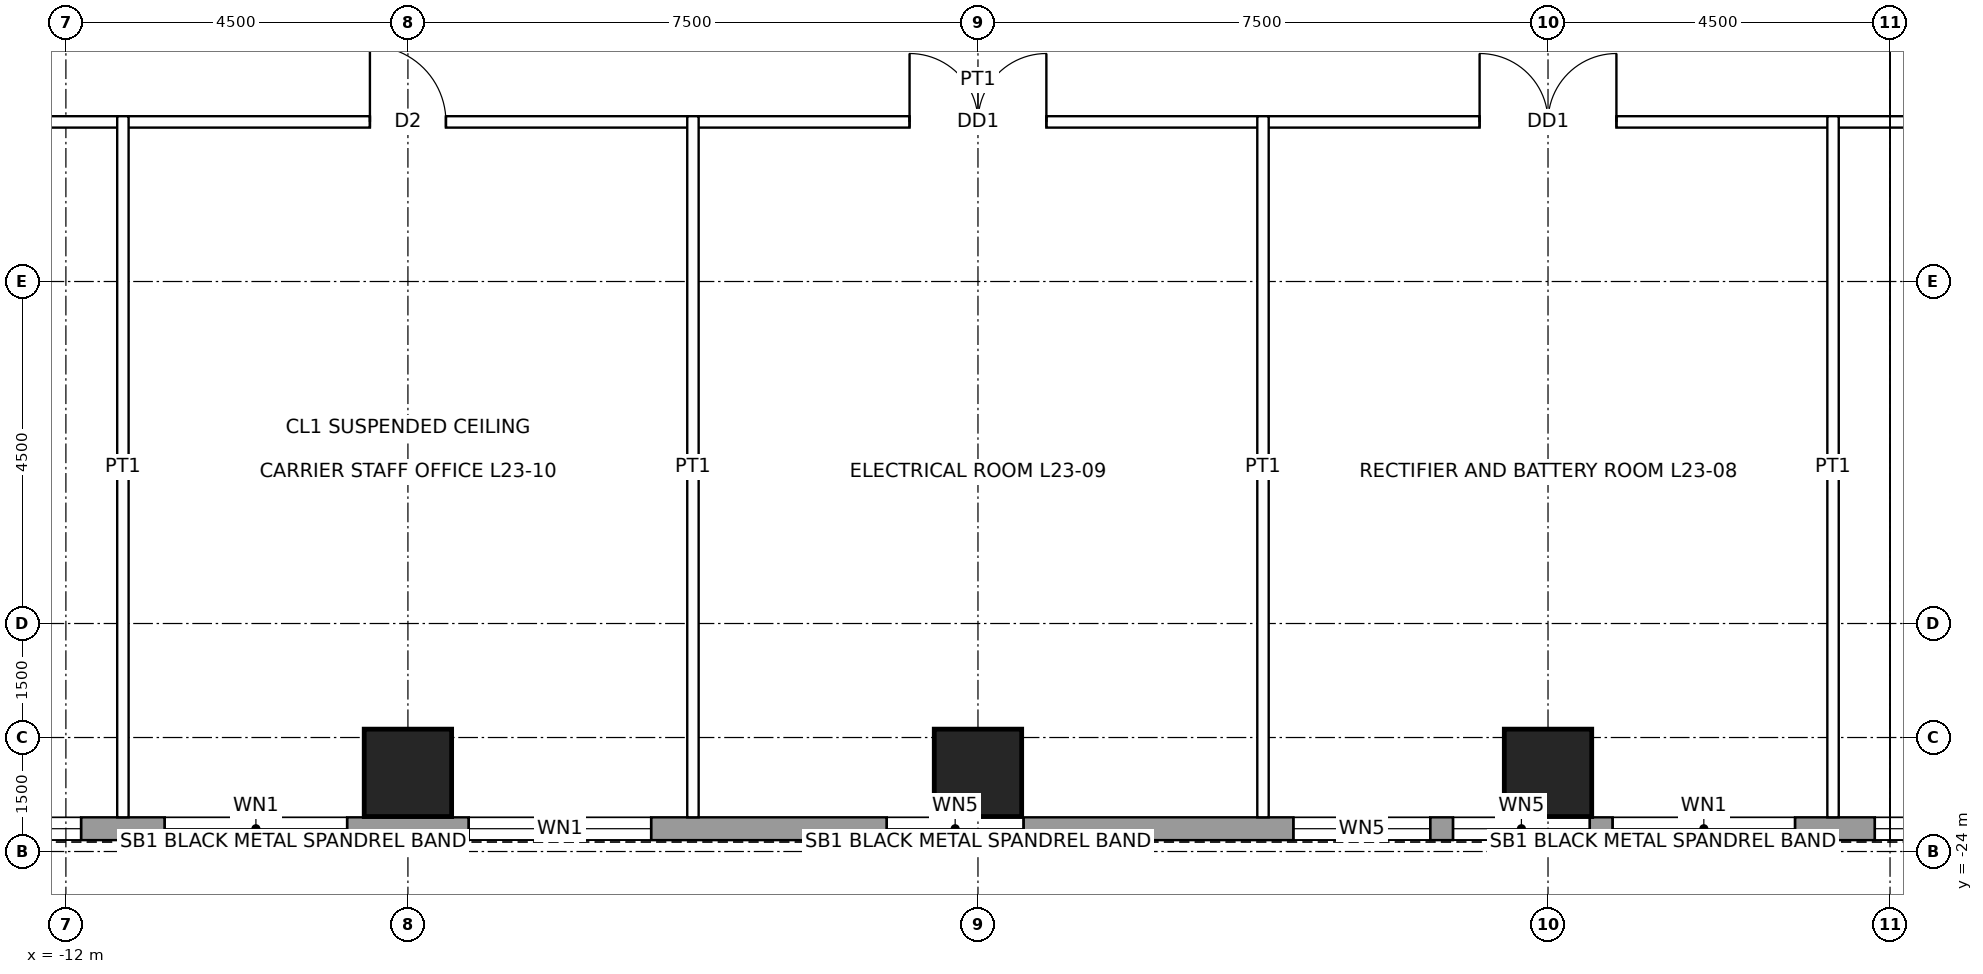
"""IFC4 building model, lengths in metres.
Left out: names, types, materials, properties, quantities, classifications, styles, units other than length and angle.
Written with IfcOpenShell. Run it as: python <this file> out.ifc"""

import sys

from ifc_helpers import new_model, si_unit, direction, frame, frame_2d, origin, origin_2d, place, context, subcontext, project, spatial, rectangle, hollow_rectangle, extrude, element, fill, save


model = new_model("IFC4")
c1 = context("Model", 3, precision=1e-05, world=origin(), true_north=direction((0.0, 1.0)))
c2 = subcontext(c1, "Body", "Model", "MODEL_VIEW")
j1 = project(units=[si_unit("LENGTHUNIT", "METRE"), si_unit("PLANEANGLEUNIT", "RADIAN")], contexts=[c1])
p1 = place(None, origin())
s1 = spatial("IfcSite", under=j1, at=p1, CompositionType="ELEMENT")
p2 = place(p1, origin())
s2 = spatial("IfcBuilding", under=s1, at=p2, CompositionType="ELEMENT")
p3 = place(p2, frame((0.0, 0.0, 117.9)))
s3 = spatial("IfcBuildingStorey", under=s2, at=p3, CompositionType="ELEMENT", Elevation=117.9)
for number, where, z_axis, x_axis in (
    (1, (7.5, -22.965, 0.0), (0.0, 0.0, 1.0), (1.0, 0.0, 0.0)),
    (2, (0.0, -22.965, 0.0), (0.0, 0.0, 1.0), (1.0, 0.0, 0.0)),
    (3, (-7.5, -22.965, 0.0), (0.0, 0.0, 1.0), (1.0, 0.0, 0.0)),
):
    element("IfcColumn", number, at=place(p3, frame(where, z_axis=z_axis, x_axis=x_axis)), inside=s3, PredefinedType="COLUMN", context=c2, shape_type="SweptSolid", body=[
        extrude(hollow_rectangle(XDim=1.15, YDim=1.15, WallThickness=0.075, at=origin_2d()), origin(), (0.0, 0.0, 1.0), 4.5),
    ])
p4 = place(p3, frame((16.2, -23.7, 0.0), z_axis=(0.0, 0.0, 1.0), x_axis=(-1.0, 0.0, 0.0)))
e4 = element("IfcWall", 4, at=p4, inside=s3, PredefinedType="SOLIDWALL", context=c2, shape_type="SweptSolid", body=[
    extrude(rectangle(XDim=32.4, YDim=0.3, at=frame_2d((16.2, 0.0))), origin(), (0.0, 0.0, 1.0), 4.3),
])
p5 = place(p4, frame((2.0, 0.0, 1.0)))
e5 = element("IfcOpeningElement", 5, at=p5, cuts=e4, PredefinedType="OPENING", context=c2, shape_type="SweptSolid", body=[
    extrude(rectangle(XDim=2.4, YDim=1.2, at=frame_2d((1.2, 0.6))), frame((0.0, 0.16, 0.0), z_axis=(0.0, -1.0, 0.0), x_axis=(1.0, 0.0, 0.0)), (0.0, 0.0, 1.0), 0.32),
])
p6 = place(p4, frame((5.45, 0.0, 1.0)))
e6 = element("IfcOpeningElement", 6, at=p6, cuts=e4, PredefinedType="OPENING", context=c2, shape_type="SweptSolid", body=[
    extrude(rectangle(XDim=2.4, YDim=1.2, at=frame_2d((1.2, 0.6))), frame((0.0, 0.16, 0.0), z_axis=(0.0, -1.0, 0.0), x_axis=(1.0, 0.0, 0.0)), (0.0, 0.0, 1.0), 0.32),
])
p7 = place(p4, frame((8.15, 0.0, 1.0)))
e7 = element("IfcOpeningElement", 7, at=p7, cuts=e4, PredefinedType="OPENING", context=c2, shape_type="SweptSolid", body=[
    extrude(rectangle(XDim=1.8, YDim=1.2, at=frame_2d((0.9, 0.6))), frame((0.0, 0.16, 0.0), z_axis=(0.0, -1.0, 0.0), x_axis=(1.0, 0.0, 0.0)), (0.0, 0.0, 1.0), 0.32),
])
p8 = place(p4, frame((10.25, 0.0, 1.0)))
e8 = element("IfcOpeningElement", 8, at=p8, cuts=e4, PredefinedType="OPENING", context=c2, shape_type="SweptSolid", body=[
    extrude(rectangle(XDim=1.8, YDim=1.2, at=frame_2d((0.9, 0.6))), frame((0.0, 0.16, 0.0), z_axis=(0.0, -1.0, 0.0), x_axis=(1.0, 0.0, 0.0)), (0.0, 0.0, 1.0), 0.32),
])
p9 = place(p4, frame((15.6, 0.0, 1.0)))
e9 = element("IfcOpeningElement", 9, at=p9, cuts=e4, PredefinedType="OPENING", context=c2, shape_type="SweptSolid", body=[
    extrude(rectangle(XDim=1.8, YDim=1.2, at=frame_2d((0.9, 0.6))), frame((0.0, 0.16, 0.0), z_axis=(0.0, -1.0, 0.0), x_axis=(1.0, 0.0, 0.0)), (0.0, 0.0, 1.0), 0.32),
])
p10 = place(p4, frame((20.5, 0.0, 1.0)))
e10 = element("IfcOpeningElement", 10, at=p10, cuts=e4, PredefinedType="OPENING", context=c2, shape_type="SweptSolid", body=[
    extrude(rectangle(XDim=2.4, YDim=1.2, at=frame_2d((1.2, 0.6))), frame((0.0, 0.16, 0.0), z_axis=(0.0, -1.0, 0.0), x_axis=(1.0, 0.0, 0.0)), (0.0, 0.0, 1.0), 0.32),
])
p11 = place(p4, frame((24.5, 0.0, 1.0)))
e11 = element("IfcOpeningElement", 11, at=p11, cuts=e4, PredefinedType="OPENING", context=c2, shape_type="SweptSolid", body=[
    extrude(rectangle(XDim=2.4, YDim=1.2, at=frame_2d((1.2, 0.6))), frame((0.0, 0.16, 0.0), z_axis=(0.0, -1.0, 0.0), x_axis=(1.0, 0.0, 0.0)), (0.0, 0.0, 1.0), 0.32),
])
p12 = place(p4, frame((28.0, 0.0, 1.0)))
e12 = element("IfcOpeningElement", 12, at=p12, cuts=e4, PredefinedType="OPENING", context=c2, shape_type="SweptSolid", body=[
    extrude(rectangle(XDim=2.4, YDim=1.2, at=frame_2d((1.2, 0.6))), frame((0.0, 0.16, 0.0), z_axis=(0.0, -1.0, 0.0), x_axis=(1.0, 0.0, 0.0)), (0.0, 0.0, 1.0), 0.32),
])
p13 = place(p3, frame((-14.475, -14.4, 0.0), z_axis=(0.0, 0.0, 1.0), x_axis=(1.0, 0.0, 0.0)))
e13 = element("IfcWall", 13, at=p13, inside=s3, PredefinedType="PARTITIONING", context=c2, shape_type="SweptSolid", body=[
    extrude(rectangle(XDim=28.95, YDim=0.15, at=frame_2d((14.475, 0.0))), origin(), (0.0, 0.0, 1.0), 4.3),
])
p14 = place(p13, frame((21.075, 0.0, 0.0)))
e14 = element("IfcOpeningElement", 14, at=p14, cuts=e13, PredefinedType="OPENING", context=c2, shape_type="SweptSolid", body=[
    extrude(rectangle(XDim=1.8, YDim=2.4, at=frame_2d((0.9, 1.2))), frame((0.0, 0.085, 0.0), z_axis=(0.0, -1.0, 0.0), x_axis=(1.0, 0.0, 0.0)), (0.0, 0.0, 1.0), 0.17),
])
p15 = place(p13, frame((13.575, 0.0, 0.0)))
e15 = element("IfcOpeningElement", 15, at=p15, cuts=e13, PredefinedType="OPENING", context=c2, shape_type="SweptSolid", body=[
    extrude(rectangle(XDim=1.8, YDim=2.4, at=frame_2d((0.9, 1.2))), frame((0.0, 0.085, 0.0), z_axis=(0.0, -1.0, 0.0), x_axis=(1.0, 0.0, 0.0)), (0.0, 0.0, 1.0), 0.17),
])
p16 = place(p13, frame((6.475, 0.0, 0.0)))
e16 = element("IfcOpeningElement", 16, at=p16, cuts=e13, PredefinedType="OPENING", context=c2, shape_type="SweptSolid", body=[
    extrude(rectangle(XDim=1.0, YDim=2.1, at=frame_2d((0.5, 1.05))), frame((0.0, 0.085, 0.0), z_axis=(0.0, -1.0, 0.0), x_axis=(1.0, 0.0, 0.0)), (0.0, 0.0, 1.0), 0.17),
])
p17 = place(p13, frame((26.8, 0.0, 0.0)))
e17 = element("IfcOpeningElement", 17, at=p17, cuts=e13, PredefinedType="OPENING", context=c2, shape_type="SweptSolid", body=[
    extrude(rectangle(XDim=1.0, YDim=2.1, at=frame_2d((0.5, 1.05))), frame((0.0, 0.085, 0.0), z_axis=(0.0, -1.0, 0.0), x_axis=(1.0, 0.0, 0.0)), (0.0, 0.0, 1.0), 0.17),
])
p18 = place(p13, frame((1.15, 0.0, 0.0)))
e18 = element("IfcOpeningElement", 18, at=p18, cuts=e13, PredefinedType="OPENING", context=c2, shape_type="SweptSolid", body=[
    extrude(rectangle(XDim=1.0, YDim=2.1, at=frame_2d((0.5, 1.05))), frame((0.0, 0.085, 0.0), z_axis=(0.0, -1.0, 0.0), x_axis=(1.0, 0.0, 0.0)), (0.0, 0.0, 1.0), 0.17),
])
for number, where, z_axis, x_axis in (
    (19, (-11.25, -23.55, 0.0), (0.0, 0.0, 1.0), (0.0, 1.0, 0.0)),
    (20, (-3.75, -23.55, 0.0), (0.0, 0.0, 1.0), (0.0, 1.0, 0.0)),
    (21, (3.75, -23.55, 0.0), (0.0, 0.0, 1.0), (0.0, 1.0, 0.0)),
    (22, (11.25, -23.55, 0.0), (0.0, 0.0, 1.0), (0.0, 1.0, 0.0)),
):
    element("IfcWall", number, at=place(p3, frame(where, z_axis=z_axis, x_axis=x_axis)), inside=s3, PredefinedType="PARTITIONING", context=c2, shape_type="SweptSolid", body=[
        extrude(rectangle(XDim=9.225, YDim=0.15, at=frame_2d((4.613, 0.0))), origin(), (0.0, 0.0, 1.0), 3.431),
    ])
p19 = place(p5, origin())
e23 = element("IfcWindow", 23, at=p19, inside=s3, PartitioningType="SINGLE_PANEL", PredefinedType="WINDOW", context=c2, shape_type="SweptSolid", body=[
    extrude(rectangle(XDim=2.4, YDim=1.2, at=frame_2d((1.2, 0.6))), frame((0.0, 0.03, 0.0), z_axis=(0.0, -1.0, 0.0), x_axis=(1.0, 0.0, 0.0)), (0.0, 0.0, 1.0), 0.06),
])
fill(e5, e23)
p20 = place(p6, origin())
e24 = element("IfcWindow", 24, at=p20, inside=s3, PartitioningType="SINGLE_PANEL", PredefinedType="WINDOW", context=c2, shape_type="SweptSolid", body=[
    extrude(rectangle(XDim=2.4, YDim=1.2, at=frame_2d((1.2, 0.6))), frame((0.0, 0.03, 0.0), z_axis=(0.0, -1.0, 0.0), x_axis=(1.0, 0.0, 0.0)), (0.0, 0.0, 1.0), 0.06),
])
fill(e6, e24)
p21 = place(p7, origin())
e25 = element("IfcWindow", 25, at=p21, inside=s3, PartitioningType="SINGLE_PANEL", PredefinedType="WINDOW", context=c2, shape_type="SweptSolid", body=[
    extrude(rectangle(XDim=1.8, YDim=1.2, at=frame_2d((0.9, 0.6))), frame((0.0, 0.03, 0.0), z_axis=(0.0, -1.0, 0.0), x_axis=(1.0, 0.0, 0.0)), (0.0, 0.0, 1.0), 0.06),
])
fill(e7, e25)
p22 = place(p8, origin())
e26 = element("IfcWindow", 26, at=p22, inside=s3, PartitioningType="SINGLE_PANEL", PredefinedType="WINDOW", context=c2, shape_type="SweptSolid", body=[
    extrude(rectangle(XDim=1.8, YDim=1.2, at=frame_2d((0.9, 0.6))), frame((0.0, 0.03, 0.0), z_axis=(0.0, -1.0, 0.0), x_axis=(1.0, 0.0, 0.0)), (0.0, 0.0, 1.0), 0.06),
])
fill(e8, e26)
p23 = place(p9, origin())
e27 = element("IfcWindow", 27, at=p23, inside=s3, PartitioningType="SINGLE_PANEL", PredefinedType="WINDOW", context=c2, shape_type="SweptSolid", body=[
    extrude(rectangle(XDim=1.8, YDim=1.2, at=frame_2d((0.9, 0.6))), frame((0.0, 0.03, 0.0), z_axis=(0.0, -1.0, 0.0), x_axis=(1.0, 0.0, 0.0)), (0.0, 0.0, 1.0), 0.06),
])
fill(e9, e27)
p24 = place(p10, origin())
e28 = element("IfcWindow", 28, at=p24, inside=s3, PartitioningType="SINGLE_PANEL", PredefinedType="WINDOW", context=c2, shape_type="SweptSolid", body=[
    extrude(rectangle(XDim=2.4, YDim=1.2, at=frame_2d((1.2, 0.6))), frame((0.0, 0.03, 0.0), z_axis=(0.0, -1.0, 0.0), x_axis=(1.0, 0.0, 0.0)), (0.0, 0.0, 1.0), 0.06),
])
fill(e10, e28)
p25 = place(p11, origin())
e29 = element("IfcWindow", 29, at=p25, inside=s3, PartitioningType="SINGLE_PANEL", PredefinedType="WINDOW", context=c2, shape_type="SweptSolid", body=[
    extrude(rectangle(XDim=2.4, YDim=1.2, at=frame_2d((1.2, 0.6))), frame((0.0, 0.03, 0.0), z_axis=(0.0, -1.0, 0.0), x_axis=(1.0, 0.0, 0.0)), (0.0, 0.0, 1.0), 0.06),
])
fill(e11, e29)
p26 = place(p12, origin())
e30 = element("IfcWindow", 30, at=p26, inside=s3, PartitioningType="SINGLE_PANEL", PredefinedType="WINDOW", context=c2, shape_type="SweptSolid", body=[
    extrude(rectangle(XDim=2.4, YDim=1.2, at=frame_2d((1.2, 0.6))), frame((0.0, 0.03, 0.0), z_axis=(0.0, -1.0, 0.0), x_axis=(1.0, 0.0, 0.0)), (0.0, 0.0, 1.0), 0.06),
])
fill(e12, e30)
p27 = place(p14, origin())
e31 = element("IfcDoor", 31, at=p27, inside=s3, OperationType="DOUBLE_DOOR_SINGLE_SWING", PredefinedType="DOOR", context=c2, shape_type="SweptSolid", body=[
    extrude(rectangle(XDim=1.8, YDim=2.4, at=frame_2d((0.9, 1.2))), frame((0.0, 0.025, 0.0), z_axis=(0.0, -1.0, 0.0), x_axis=(1.0, 0.0, 0.0)), (0.0, 0.0, 1.0), 0.05),
])
fill(e14, e31)
p28 = place(p15, origin())
e32 = element("IfcDoor", 32, at=p28, inside=s3, OperationType="DOUBLE_DOOR_SINGLE_SWING", PredefinedType="DOOR", context=c2, shape_type="SweptSolid", body=[
    extrude(rectangle(XDim=1.8, YDim=2.4, at=frame_2d((0.9, 1.2))), frame((0.0, 0.025, 0.0), z_axis=(0.0, -1.0, 0.0), x_axis=(1.0, 0.0, 0.0)), (0.0, 0.0, 1.0), 0.05),
])
fill(e15, e32)
p29 = place(p16, origin())
e33 = element("IfcDoor", 33, at=p29, inside=s3, OperationType="SINGLE_SWING_LEFT", PredefinedType="DOOR", context=c2, shape_type="SweptSolid", body=[
    extrude(rectangle(XDim=1.0, YDim=2.1, at=frame_2d((0.5, 1.05))), frame((0.0, 0.025, 0.0), z_axis=(0.0, -1.0, 0.0), x_axis=(1.0, 0.0, 0.0)), (0.0, 0.0, 1.0), 0.05),
])
fill(e16, e33)
save(model, sys.argv[1])
